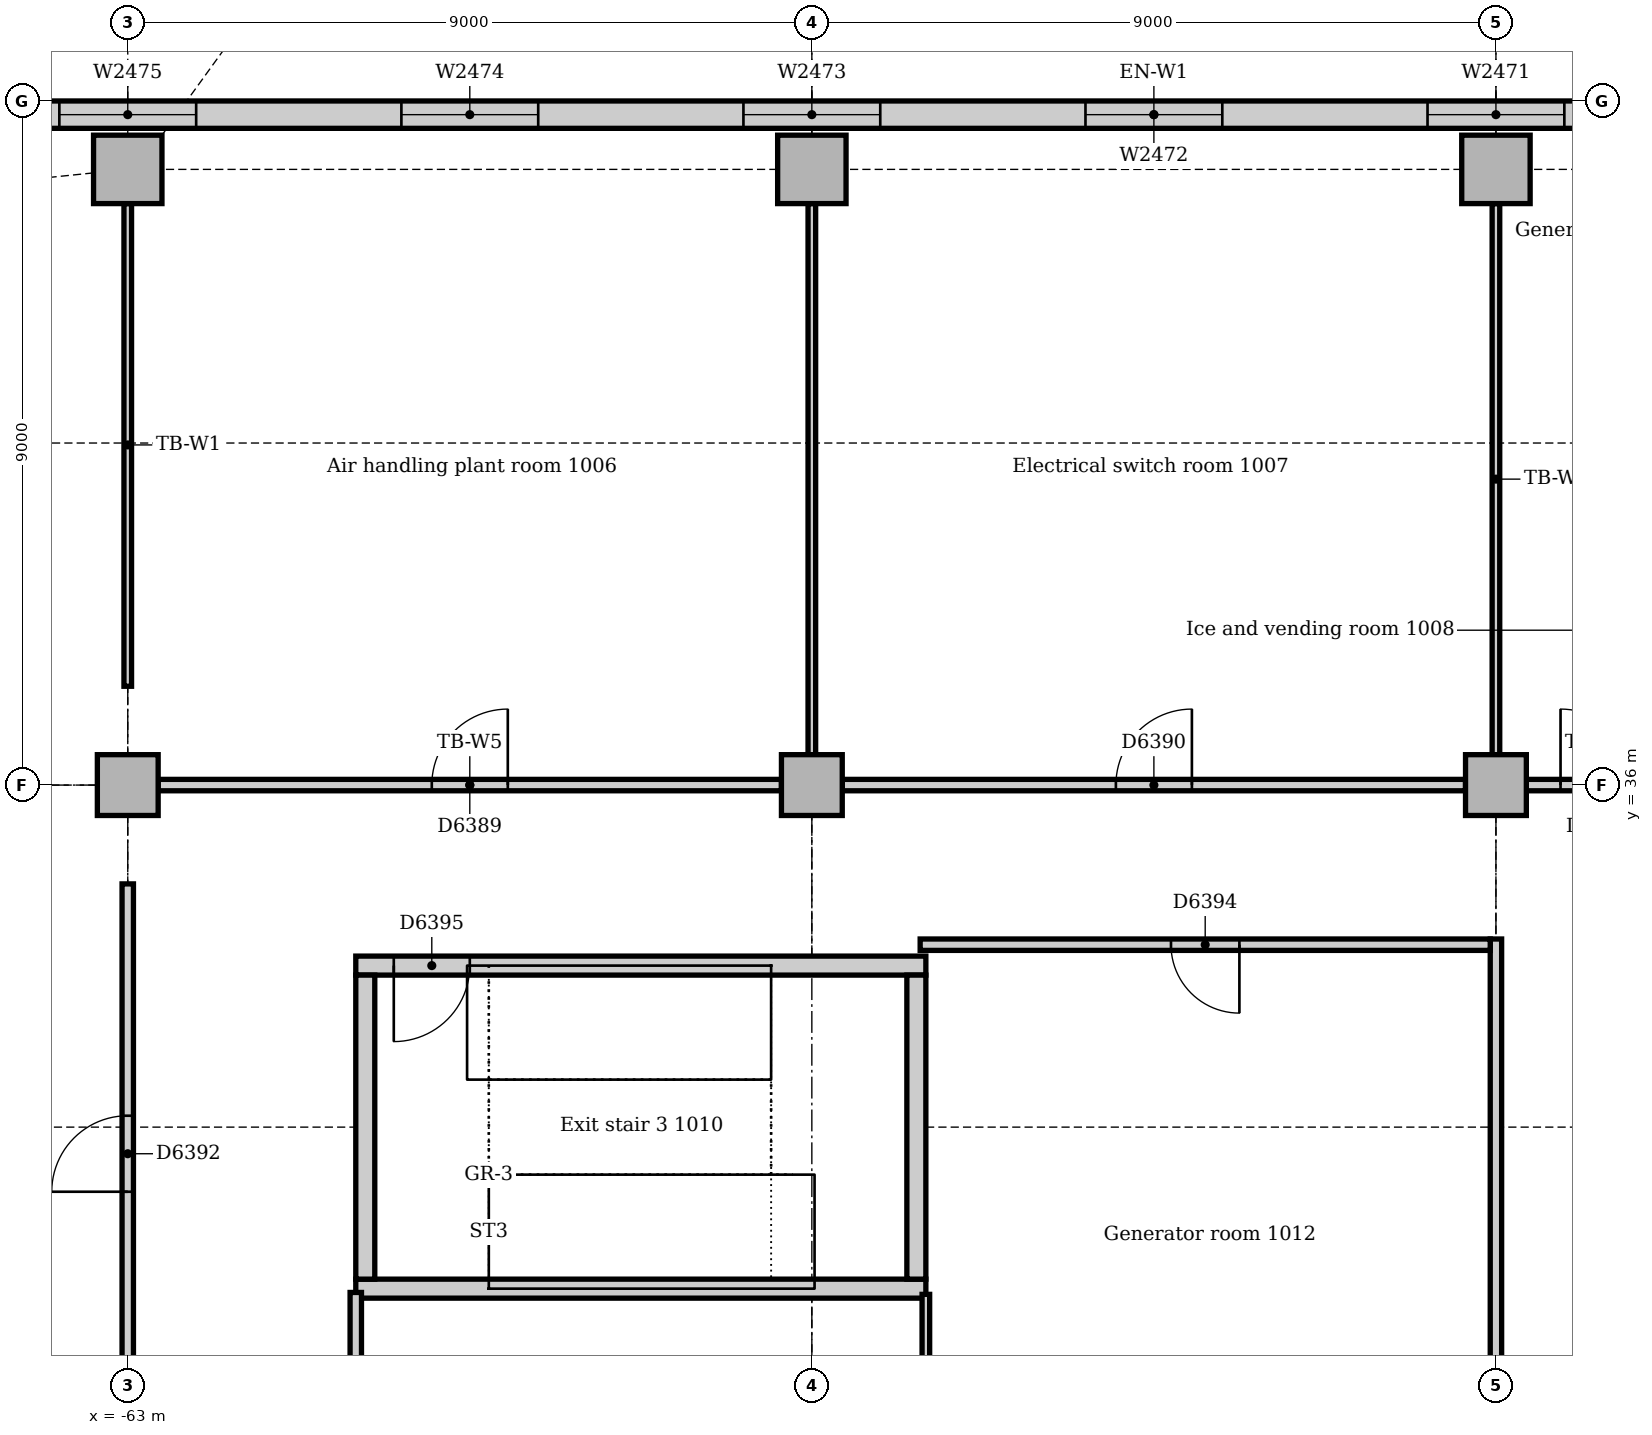
"""IFC4 building model, lengths in metres.
Left out: names, types, materials, properties, quantities, classifications, styles, units other than length and angle.
Written with IfcOpenShell. Run it as: python <this file> out.ifc"""

import sys

from ifc_helpers import new_model, si_unit, direction, frame, frame_2d, origin, origin_2d, place, context, subcontext, project, spatial, rectangle, extrude, element, fill, save


model = new_model("IFC4")
c1 = context("Model", 3, precision=1e-05, world=origin(), true_north=direction((0.0, 1.0)))
c2 = subcontext(c1, "Body", "Model", "MODEL_VIEW")
j1 = project(units=[si_unit("LENGTHUNIT", "METRE"), si_unit("PLANEANGLEUNIT", "RADIAN")], contexts=[c1])
p1 = place(None, origin())
s1 = spatial("IfcSite", under=j1, at=p1, CompositionType="ELEMENT")
p2 = place(p1, origin())
s2 = spatial("IfcBuilding", under=s1, at=p2, CompositionType="ELEMENT")
p3 = place(p2, frame((0.0, 0.0, 46.0)))
s3 = spatial("IfcBuildingStorey", under=s2, at=p3, CompositionType="ELEMENT", Elevation=46.0)
p4 = place(p3, frame((-60.0, 29.375, 0.0), z_axis=(0.0, 0.0, 1.0), x_axis=(1.0, 0.0, 0.0)))
e1 = element("IfcWall", 1, at=p4, inside=s3, PredefinedType="SOLIDWALL", context=c2, shape_type="SweptSolid", body=[
    extrude(rectangle(XDim=7.5, YDim=0.25, at=frame_2d((3.75, 0.0))), origin(), (0.0, 0.0, 1.0), 5.0),
])
p5 = place(p3, frame((-52.5, 33.625, 0.0), z_axis=(0.0, 0.0, 1.0), x_axis=(-1.0, 0.0, 0.0)))
e2 = element("IfcWall", 2, at=p5, inside=s3, PredefinedType="SOLIDWALL", context=c2, shape_type="SweptSolid", body=[
    extrude(rectangle(XDim=7.5, YDim=0.25, at=frame_2d((3.75, 0.0))), origin(), (0.0, 0.0, 1.0), 5.0),
])
p6 = place(p5, frame((6.0, 0.0, 0.0)))
e3 = element("IfcOpeningElement", 3, at=p6, cuts=e2, PredefinedType="OPENING", context=c2, shape_type="SweptSolid", body=[
    extrude(rectangle(XDim=1.0, YDim=2.1, at=frame_2d((0.5, 1.05))), frame((0.0, 0.135, 0.0), z_axis=(0.0, -1.0, 0.0), x_axis=(1.0, 0.0, 0.0)), (0.0, 0.0, 1.0), 0.27),
])
for number, where, z_axis, x_axis in (
    (4, (-52.625, 29.5, 0.0), (0.0, 0.0, 1.0), (0.0, 1.0, 0.0)),
    (5, (-59.875, 33.5, 0.0), (0.0, 0.0, 1.0), (0.0, -1.0, 0.0)),
):
    element("IfcWall", number, at=place(p3, frame(where, z_axis=z_axis, x_axis=x_axis)), inside=s3, PredefinedType="SOLIDWALL", context=c2, shape_type="SweptSolid", body=[
        extrude(rectangle(XDim=4.0, YDim=0.25, at=frame_2d((2.0, 0.0))), origin(), (0.0, 0.0, 1.0), 5.0),
    ])
for number, where, z_axis, x_axis in (
    (6, (-63.0, 44.1, 0.0), (0.0, 0.0, 1.0), (1.0, 0.0, 0.0)),
    (7, (-54.0, 44.1, 0.0), (0.0, 0.0, 1.0), (1.0, 0.0, 0.0)),
    (8, (-45.0, 44.1, 0.0), (0.0, 0.0, 1.0), (1.0, 0.0, 0.0)),
):
    element("IfcColumn", number, at=place(p3, frame(where, z_axis=z_axis, x_axis=x_axis)), inside=s3, PredefinedType="COLUMN", context=c2, shape_type="SweptSolid", body=[
        extrude(rectangle(XDim=0.9, YDim=0.9, at=origin_2d()), origin(), (0.0, 0.0, 1.0), 4.85),
    ])
for number, where, z_axis, x_axis in (
    (9, (-63.0, 36.0, 0.0), (0.0, 0.0, 1.0), (1.0, 0.0, 0.0)),
    (10, (-54.0, 36.0, 0.0), (0.0, 0.0, 1.0), (1.0, 0.0, 0.0)),
    (11, (-45.0, 36.0, 0.0), (0.0, 0.0, 1.0), (1.0, 0.0, 0.0)),
):
    element("IfcColumn", number, at=place(p3, frame(where, z_axis=z_axis, x_axis=x_axis)), inside=s3, PredefinedType="COLUMN", context=c2, shape_type="SweptSolid", body=[
        extrude(rectangle(XDim=0.8, YDim=0.8, at=origin_2d()), origin(), (0.0, 0.0, 1.0), 4.85),
    ])
p7 = place(p3, frame((-31.243, 44.82, 0.0), z_axis=(0.0, 0.0, 1.0), x_axis=(-1.0, 0.0, 0.0)))
e12 = element("IfcWall", 12, at=p7, inside=s3, PredefinedType="STANDARD", context=c2, shape_type="SweptSolid", body=[
    extrude(rectangle(XDim=36.515, YDim=0.36, at=frame_2d((18.257, 0.0))), origin(), (0.0, 0.0, 1.0), 3.25),
])
p8 = place(p7, frame((3.857, 0.0, 1.2)))
e13 = element("IfcOpeningElement", 13, at=p8, cuts=e12, PredefinedType="OPENING", context=c2, shape_type="SweptSolid", body=[
    extrude(rectangle(XDim=1.8, YDim=1.2, at=frame_2d((0.9, 0.6))), frame((0.0, 0.19, 0.0), z_axis=(0.0, -1.0, 0.0), x_axis=(1.0, 0.0, 0.0)), (0.0, 0.0, 1.0), 0.38),
])
p9 = place(p7, frame((8.357, 0.0, 1.2)))
e14 = element("IfcOpeningElement", 14, at=p9, cuts=e12, PredefinedType="OPENING", context=c2, shape_type="SweptSolid", body=[
    extrude(rectangle(XDim=1.8, YDim=1.2, at=frame_2d((0.9, 0.6))), frame((0.0, 0.19, 0.0), z_axis=(0.0, -1.0, 0.0), x_axis=(1.0, 0.0, 0.0)), (0.0, 0.0, 1.0), 0.38),
])
p10 = place(p7, frame((12.857, 0.0, 1.2)))
e15 = element("IfcOpeningElement", 15, at=p10, cuts=e12, PredefinedType="OPENING", context=c2, shape_type="SweptSolid", body=[
    extrude(rectangle(XDim=1.8, YDim=1.2, at=frame_2d((0.9, 0.6))), frame((0.0, 0.19, 0.0), z_axis=(0.0, -1.0, 0.0), x_axis=(1.0, 0.0, 0.0)), (0.0, 0.0, 1.0), 0.38),
])
p11 = place(p7, frame((17.357, 0.0, 1.2)))
e16 = element("IfcOpeningElement", 16, at=p11, cuts=e12, PredefinedType="OPENING", context=c2, shape_type="SweptSolid", body=[
    extrude(rectangle(XDim=1.8, YDim=1.2, at=frame_2d((0.9, 0.6))), frame((0.0, 0.19, 0.0), z_axis=(0.0, -1.0, 0.0), x_axis=(1.0, 0.0, 0.0)), (0.0, 0.0, 1.0), 0.38),
])
p12 = place(p7, frame((21.857, 0.0, 1.2)))
e17 = element("IfcOpeningElement", 17, at=p12, cuts=e12, PredefinedType="OPENING", context=c2, shape_type="SweptSolid", body=[
    extrude(rectangle(XDim=1.8, YDim=1.2, at=frame_2d((0.9, 0.6))), frame((0.0, 0.19, 0.0), z_axis=(0.0, -1.0, 0.0), x_axis=(1.0, 0.0, 0.0)), (0.0, 0.0, 1.0), 0.38),
])
p13 = place(p7, frame((26.357, 0.0, 1.2)))
e18 = element("IfcOpeningElement", 18, at=p13, cuts=e12, PredefinedType="OPENING", context=c2, shape_type="SweptSolid", body=[
    extrude(rectangle(XDim=1.8, YDim=1.2, at=frame_2d((0.9, 0.6))), frame((0.0, 0.19, 0.0), z_axis=(0.0, -1.0, 0.0), x_axis=(1.0, 0.0, 0.0)), (0.0, 0.0, 1.0), 0.38),
])
p14 = place(p7, frame((30.857, 0.0, 1.2)))
e19 = element("IfcOpeningElement", 19, at=p14, cuts=e12, PredefinedType="OPENING", context=c2, shape_type="SweptSolid", body=[
    extrude(rectangle(XDim=1.8, YDim=1.2, at=frame_2d((0.9, 0.6))), frame((0.0, 0.19, 0.0), z_axis=(0.0, -1.0, 0.0), x_axis=(1.0, 0.0, 0.0)), (0.0, 0.0, 1.0), 0.38),
])
p15 = place(p3, frame((-62.6, 36.0, 0.0), z_axis=(0.0, 0.0, 1.0), x_axis=(1.0, 0.0, 0.0)))
e20 = element("IfcWall", 20, at=p15, inside=s3, PredefinedType="PARTITIONING", context=c2, shape_type="SweptSolid", body=[
    extrude(rectangle(XDim=8.2, YDim=0.15, at=frame_2d((4.1, 0.0))), origin(), (0.0, 0.0, 1.0), 4.158),
])
p16 = place(p15, frame((3.6, 0.0, 0.0)))
e21 = element("IfcOpeningElement", 21, at=p16, cuts=e20, PredefinedType="OPENING", context=c2, shape_type="SweptSolid", body=[
    extrude(rectangle(XDim=1.0, YDim=2.1, at=frame_2d((0.5, 1.05))), frame((0.0, 0.085, 0.0), z_axis=(0.0, -1.0, 0.0), x_axis=(1.0, 0.0, 0.0)), (0.0, 0.0, 1.0), 0.17),
])
p17 = place(p3, frame((-53.6, 36.0, 0.0), z_axis=(0.0, 0.0, 1.0), x_axis=(1.0, 0.0, 0.0)))
e22 = element("IfcWall", 22, at=p17, inside=s3, PredefinedType="PARTITIONING", context=c2, shape_type="SweptSolid", body=[
    extrude(rectangle(XDim=8.2, YDim=0.15, at=frame_2d((4.1, 0.0))), origin(), (0.0, 0.0, 1.0), 4.158),
])
p18 = place(p17, frame((3.6, 0.0, 0.0)))
e23 = element("IfcOpeningElement", 23, at=p18, cuts=e22, PredefinedType="OPENING", context=c2, shape_type="SweptSolid", body=[
    extrude(rectangle(XDim=1.0, YDim=2.1, at=frame_2d((0.5, 1.05))), frame((0.0, 0.085, 0.0), z_axis=(0.0, -1.0, 0.0), x_axis=(1.0, 0.0, 0.0)), (0.0, 0.0, 1.0), 0.17),
])
p19 = place(p3, frame((-44.6, 36.0, 0.0), z_axis=(0.0, 0.0, 1.0), x_axis=(1.0, 0.0, 0.0)))
e24 = element("IfcWall", 24, at=p19, inside=s3, PredefinedType="PARTITIONING", context=c2, shape_type="SweptSolid", body=[
    extrude(rectangle(XDim=1.875, YDim=0.15, at=frame_2d((0.938, 0.0))), origin(), (0.0, 0.0, 1.0), 4.602),
])
p20 = place(p19, frame((0.45, 0.0, 0.0)))
e25 = element("IfcOpeningElement", 25, at=p20, cuts=e24, PredefinedType="OPENING", context=c2, shape_type="SweptSolid", body=[
    extrude(rectangle(XDim=1.0, YDim=2.1, at=frame_2d((0.5, 1.05))), frame((0.0, 0.085, 0.0), z_axis=(0.0, -1.0, 0.0), x_axis=(1.0, 0.0, 0.0)), (0.0, 0.0, 1.0), 0.17),
])
p21 = place(p3, frame((-63.0, 28.3, 0.0), z_axis=(0.0, 0.0, 1.0), x_axis=(0.0, 1.0, 0.0)))
e26 = element("IfcWall", 26, at=p21, inside=s3, PredefinedType="PARTITIONING", context=c2, shape_type="SweptSolid", body=[
    extrude(rectangle(XDim=6.4, YDim=0.15, at=frame_2d((3.2, 0.0))), origin(), (0.0, 0.0, 1.0), 4.25),
])
p22 = place(p21, frame((2.35, 0.0, 0.0)))
e27 = element("IfcOpeningElement", 27, at=p22, cuts=e26, PredefinedType="OPENING", context=c2, shape_type="SweptSolid", body=[
    extrude(rectangle(XDim=1.0, YDim=2.1, at=frame_2d((0.5, 1.05))), frame((0.0, 0.085, 0.0), z_axis=(0.0, -1.0, 0.0), x_axis=(1.0, 0.0, 0.0)), (0.0, 0.0, 1.0), 0.17),
])
p23 = place(p3, frame((-45.0, 27.4, 0.0), z_axis=(0.0, 0.0, 1.0), x_axis=(0.0, 1.0, 0.0)))
e28 = element("IfcWall", 28, at=p23, inside=s3, PredefinedType="PARTITIONING", context=c2, shape_type="SweptSolid", body=[
    extrude(rectangle(XDim=6.575, YDim=0.15, at=frame_2d((3.288, 0.0))), origin(), (0.0, 0.0, 1.0), 4.256),
])
p24 = place(p3, frame((-60.0, 20.075, 0.0), z_axis=(0.0, 0.0, 1.0), x_axis=(0.0, 1.0, 0.0)))
e29 = element("IfcWall", 29, at=p24, inside=s3, PredefinedType="PARTITIONING", context=c2, shape_type="SweptSolid", body=[
    extrude(rectangle(XDim=9.25, YDim=0.15, at=frame_2d((4.625, 0.0))), origin(), (0.0, 0.0, 1.0), 4.85),
])
p25 = place(p3, frame((-52.575, 33.9, 0.0), z_axis=(0.0, 0.0, 1.0), x_axis=(1.0, 0.0, 0.0)))
e30 = element("IfcWall", 30, at=p25, inside=s3, PredefinedType="PARTITIONING", context=c2, shape_type="SweptSolid", body=[
    extrude(rectangle(XDim=7.5, YDim=0.15, at=frame_2d((3.75, 0.0))), origin(), (0.0, 0.0, 1.0), 4.85),
])
p26 = place(p25, frame((3.3, 0.0, 0.0)))
e31 = element("IfcOpeningElement", 31, at=p26, cuts=e30, PredefinedType="OPENING", context=c2, shape_type="SweptSolid", body=[
    extrude(rectangle(XDim=0.9, YDim=2.1, at=frame_2d((0.45, 1.05))), frame((0.0, 0.085, 0.0), z_axis=(0.0, -1.0, 0.0), x_axis=(1.0, 0.0, 0.0)), (0.0, 0.0, 1.0), 0.17),
])
p27 = place(p3, frame((-52.5, 20.075, 0.0), z_axis=(0.0, 0.0, 1.0), x_axis=(0.0, 1.0, 0.0)))
e32 = element("IfcWall", 32, at=p27, inside=s3, PredefinedType="PARTITIONING", context=c2, shape_type="SweptSolid", body=[
    extrude(rectangle(XDim=9.225, YDim=0.1, at=frame_2d((4.612, 0.0))), origin(), (0.0, 0.0, 1.0), 4.85),
])
p28 = place(p3, frame((-63.0, 37.3, 0.0), z_axis=(0.0, 0.0, 1.0), x_axis=(0.0, 1.0, 0.0)))
e33 = element("IfcWall", 33, at=p28, inside=s3, PredefinedType="PARTITIONING", context=c2, shape_type="SweptSolid", body=[
    extrude(rectangle(XDim=6.35, YDim=0.1, at=frame_2d((3.175, 0.0))), origin(), (0.0, 0.0, 1.0), 4.254),
])
for number, where, z_axis, x_axis in (
    (34, (-54.0, 36.4, 0.0), (0.0, 0.0, 1.0), (0.0, 1.0, 0.0)),
    (35, (-45.0, 36.4, 0.0), (0.0, 0.0, 1.0), (0.0, 1.0, 0.0)),
):
    element("IfcWall", number, at=place(p3, frame(where, z_axis=z_axis, x_axis=x_axis)), inside=s3, PredefinedType="PARTITIONING", context=c2, shape_type="SweptSolid", body=[
        extrude(rectangle(XDim=7.25, YDim=0.1, at=frame_2d((3.625, 0.0))), origin(), (0.0, 0.0, 1.0), 4.256),
    ])
p29 = place(p10, origin())
e36 = element("IfcWindow", 36, at=p29, inside=s3, PartitioningType="SINGLE_PANEL", PredefinedType="WINDOW", context=c2, shape_type="SweptSolid", body=[
    extrude(rectangle(XDim=1.8, YDim=1.2, at=frame_2d((0.9, 0.6))), frame((0.0, 0.13, 0.0), z_axis=(0.0, -1.0, 0.0), x_axis=(1.0, 0.0, 0.0)), (0.0, 0.0, 1.0), 0.06),
])
fill(e15, e36)
p30 = place(p11, origin())
e37 = element("IfcWindow", 37, at=p30, inside=s3, PartitioningType="SINGLE_PANEL", PredefinedType="WINDOW", context=c2, shape_type="SweptSolid", body=[
    extrude(rectangle(XDim=1.8, YDim=1.2, at=frame_2d((0.9, 0.6))), frame((0.0, 0.13, 0.0), z_axis=(0.0, -1.0, 0.0), x_axis=(1.0, 0.0, 0.0)), (0.0, 0.0, 1.0), 0.06),
])
fill(e16, e37)
p31 = place(p12, origin())
e38 = element("IfcWindow", 38, at=p31, inside=s3, PartitioningType="SINGLE_PANEL", PredefinedType="WINDOW", context=c2, shape_type="SweptSolid", body=[
    extrude(rectangle(XDim=1.8, YDim=1.2, at=frame_2d((0.9, 0.6))), frame((0.0, 0.13, 0.0), z_axis=(0.0, -1.0, 0.0), x_axis=(1.0, 0.0, 0.0)), (0.0, 0.0, 1.0), 0.06),
])
fill(e17, e38)
p32 = place(p13, origin())
e39 = element("IfcWindow", 39, at=p32, inside=s3, PartitioningType="SINGLE_PANEL", PredefinedType="WINDOW", context=c2, shape_type="SweptSolid", body=[
    extrude(rectangle(XDim=1.8, YDim=1.2, at=frame_2d((0.9, 0.6))), frame((0.0, 0.13, 0.0), z_axis=(0.0, -1.0, 0.0), x_axis=(1.0, 0.0, 0.0)), (0.0, 0.0, 1.0), 0.06),
])
fill(e18, e39)
p33 = place(p14, origin())
e40 = element("IfcWindow", 40, at=p33, inside=s3, PartitioningType="SINGLE_PANEL", PredefinedType="WINDOW", context=c2, shape_type="SweptSolid", body=[
    extrude(rectangle(XDim=1.8, YDim=1.2, at=frame_2d((0.9, 0.6))), frame((0.0, 0.13, 0.0), z_axis=(0.0, -1.0, 0.0), x_axis=(1.0, 0.0, 0.0)), (0.0, 0.0, 1.0), 0.06),
])
fill(e19, e40)
p34 = place(p20, origin())
e41 = element("IfcDoor", 41, at=p34, inside=s3, OperationType="SINGLE_SWING_LEFT", PredefinedType="DOOR", context=c2, shape_type="SweptSolid", body=[
    extrude(rectangle(XDim=1.0, YDim=2.1, at=frame_2d((0.5, 1.05))), frame((0.0, 0.025, 0.0), z_axis=(0.0, -1.0, 0.0), x_axis=(1.0, 0.0, 0.0)), (0.0, 0.0, 1.0), 0.05),
])
fill(e25, e41)
p35 = place(p16, origin())
e42 = element("IfcDoor", 42, at=p35, inside=s3, OperationType="SINGLE_SWING_RIGHT", PredefinedType="DOOR", context=c2, shape_type="SweptSolid", body=[
    extrude(rectangle(XDim=1.0, YDim=2.1, at=frame_2d((0.5, 1.05))), frame((0.0, 0.025, 0.0), z_axis=(0.0, -1.0, 0.0), x_axis=(1.0, 0.0, 0.0)), (0.0, 0.0, 1.0), 0.05),
])
fill(e21, e42)
p36 = place(p18, origin())
e43 = element("IfcDoor", 43, at=p36, inside=s3, OperationType="SINGLE_SWING_RIGHT", PredefinedType="DOOR", context=c2, shape_type="SweptSolid", body=[
    extrude(rectangle(XDim=1.0, YDim=2.1, at=frame_2d((0.5, 1.05))), frame((0.0, 0.025, 0.0), z_axis=(0.0, -1.0, 0.0), x_axis=(1.0, 0.0, 0.0)), (0.0, 0.0, 1.0), 0.05),
])
fill(e23, e43)
p37 = place(p22, origin())
e44 = element("IfcDoor", 44, at=p37, inside=s3, OperationType="SINGLE_SWING_LEFT", PredefinedType="DOOR", context=c2, shape_type="SweptSolid", body=[
    extrude(rectangle(XDim=1.0, YDim=2.1, at=frame_2d((0.5, 1.05))), frame((0.0, 0.025, 0.0), z_axis=(0.0, -1.0, 0.0), x_axis=(1.0, 0.0, 0.0)), (0.0, 0.0, 1.0), 0.05),
])
fill(e27, e44)
p38 = place(p26, frame((0.9, 0.0, 0.0), z_axis=(0.0, 0.0, 1.0), x_axis=(-1.0, 0.0, 0.0)))
e45 = element("IfcDoor", 45, at=p38, inside=s3, OperationType="SINGLE_SWING_LEFT", PredefinedType="DOOR", context=c2, shape_type="SweptSolid", body=[
    extrude(rectangle(XDim=0.9, YDim=2.1, at=frame_2d((0.45, 1.05))), frame((0.0, 0.025, 0.0), z_axis=(0.0, -1.0, 0.0), x_axis=(1.0, 0.0, 0.0)), (0.0, 0.0, 1.0), 0.05),
])
fill(e31, e45)
p39 = place(p6, origin())
e46 = element("IfcDoor", 46, at=p39, inside=s3, OperationType="SINGLE_SWING_RIGHT", PredefinedType="DOOR", context=c2, shape_type="SweptSolid", body=[
    extrude(rectangle(XDim=1.0, YDim=2.1, at=frame_2d((0.5, 1.05))), frame((0.0, 0.025, 0.0), z_axis=(0.0, -1.0, 0.0), x_axis=(1.0, 0.0, 0.0)), (0.0, 0.0, 1.0), 0.05),
])
fill(e3, e46)
save(model, sys.argv[1])
